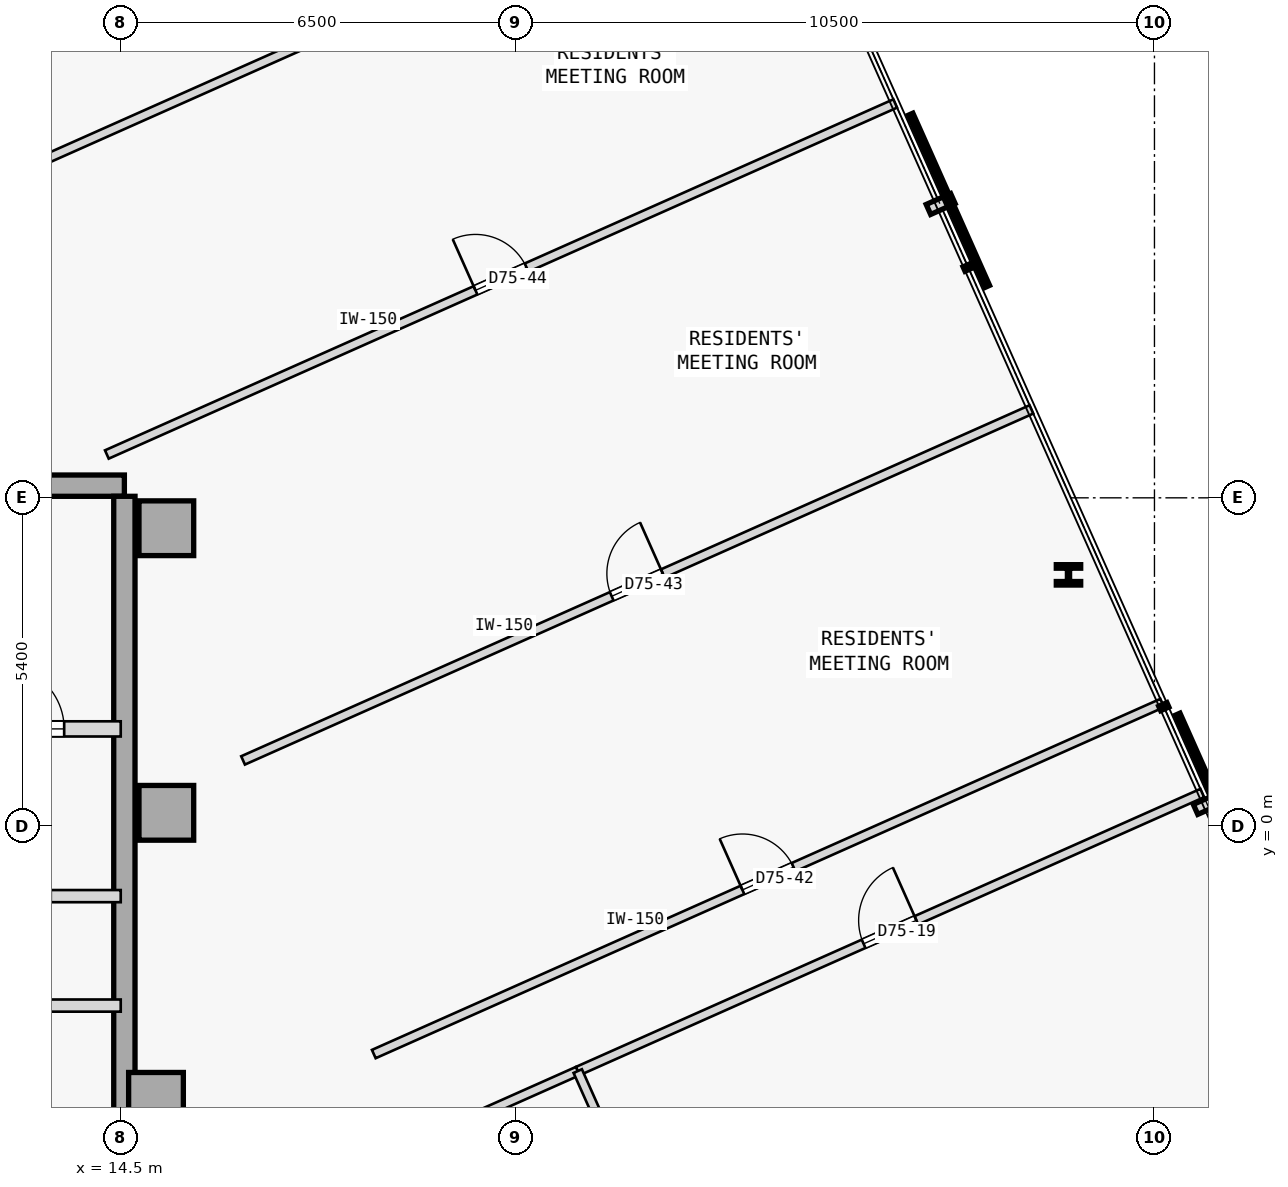
"""IFC4 building model, lengths in metres.
Left out: names, types, materials, properties, quantities, classifications, styles, units other than length and angle.
Written with IfcOpenShell. Run it as: python <this file> out.ifc"""

import sys

from ifc_helpers import new_model, si_unit, direction, frame, frame_2d, origin, origin_2d, place, context, subcontext, project, spatial, rectangle, i_section, extrude, element, fill, save


model = new_model("IFC4")
c1 = context("Model", 3, precision=1e-05, world=origin(), true_north=direction((0.0, 1.0)))
c2 = subcontext(c1, "Body", "Model", "MODEL_VIEW")
j1 = project(units=[si_unit("LENGTHUNIT", "METRE"), si_unit("PLANEANGLEUNIT", "RADIAN")], contexts=[c1])
p1 = place(None, origin())
s1 = spatial("IfcSite", under=j1, at=p1, CompositionType="ELEMENT")
p2 = place(p1, origin())
s2 = spatial("IfcBuilding", under=s1, at=p2, CompositionType="ELEMENT")
p3 = place(p2, frame((0.0, 0.0, 281.9)))
s3 = spatial("IfcBuildingStorey", under=s2, at=p3, CompositionType="ELEMENT", Elevation=281.9)
for number, where, z_axis, x_axis in (
    (1, (15.25, 4.9, 0.0), (0.0, 0.0, 1.0), (1.0, 0.0, 0.0)),
    (2, (15.25, 0.22, 0.0), (0.0, 0.0, 1.0), (1.0, 0.0, 0.0)),
    (3, (15.08, -4.5, 0.0), (0.0, 0.0, 1.0), (1.0, 0.0, 0.0)),
):
    element("IfcColumn", number, at=place(p3, frame(where, z_axis=z_axis, x_axis=x_axis)), inside=s3, PredefinedType="COLUMN", context=c2, shape_type="SweptSolid", body=[
        extrude(rectangle(XDim=0.9, YDim=0.9, at=origin_2d()), origin(), (0.0, 0.0, 1.0), 3.35),
    ])
p4 = place(p3, frame((3.15, 5.6, 0.0), z_axis=(0.0, 0.0, 1.0), x_axis=(1.0, 0.0, 0.0)))
e4 = element("IfcWall", 4, at=p4, inside=s3, PredefinedType="SHEAR", context=c2, shape_type="SweptSolid", body=[
    extrude(rectangle(XDim=11.41, YDim=0.35, at=frame_2d((5.705, 0.0))), origin(), (0.0, 0.0, 1.0), 3.125),
])
p5 = place(p3, frame((14.56, -5.425, 0.0), z_axis=(0.0, 0.0, 1.0), x_axis=(0.0, 1.0, 0.0)))
e5 = element("IfcWall", 5, at=p5, inside=s3, PredefinedType="SHEAR", context=c2, shape_type="SweptSolid", body=[
    extrude(rectangle(XDim=10.85, YDim=0.35, at=frame_2d((5.425, 0.0))), origin(), (0.0, 0.0, 1.0), 3.125),
])
p6 = place(p3, frame((30.086, 4.133, 0.0), z_axis=(0.0, 0.0, 1.0), x_axis=(1.0, 0.0, 0.0)))
e6 = element("IfcColumn", 6, at=p6, inside=s3, PredefinedType="COLUMN", context=c2, shape_type="SweptSolid", body=[
    extrude(i_section(OverallWidth=0.401, OverallDepth=0.335, WebThickness=0.036, FlangeThickness=0.058, FilletRadius=0.015, at=origin_2d()), origin(), (0.0, 0.0, 1.0), 3.35),
])
p7 = place(p3, frame((10.9, 1.6, 0.0), z_axis=(0.0, 0.0, 1.0), x_axis=(1.0, 0.0, 0.0)))
e7 = element("IfcWall", 7, at=p7, inside=s3, PredefinedType="STANDARD", context=c2, shape_type="SweptSolid", body=[
    extrude(rectangle(XDim=3.6, YDim=0.25, at=frame_2d((1.8, 0.0))), origin(), (0.0, 0.0, 1.0), 3.125),
])
p8 = place(p7, frame((1.62, 0.0, 0.0)))
e8 = element("IfcOpeningElement", 8, at=p8, cuts=e7, PredefinedType="OPENING", context=c2, shape_type="SweptSolid", body=[
    extrude(rectangle(XDim=1.05, YDim=2.15, at=frame_2d((0.525, 1.075))), frame((0.0, 0.135, 0.0), z_axis=(0.0, -1.0, 0.0), x_axis=(1.0, 0.0, 0.0)), (0.0, 0.0, 1.0), 0.27),
])
p9 = place(p3, frame((11.55, -1.15, 0.0), z_axis=(0.0, 0.0, 1.0), x_axis=(1.0, 0.0, 0.0)))
e9 = element("IfcWall", 9, at=p9, inside=s3, PredefinedType="STANDARD", context=c2, shape_type="SweptSolid", body=[
    extrude(rectangle(XDim=2.95, YDim=0.2, at=frame_2d((1.475, 0.0))), origin(), (0.0, 0.0, 1.0), 3.125),
])
p10 = place(p9, frame((0.75, 0.0, 0.0)))
e10 = element("IfcOpeningElement", 10, at=p10, cuts=e9, PredefinedType="OPENING", context=c2, shape_type="SweptSolid", body=[
    extrude(rectangle(XDim=1.05, YDim=2.18, at=frame_2d((0.525, 1.09))), frame((0.0, 0.11, 0.0), z_axis=(0.0, -1.0, 0.0), x_axis=(1.0, 0.0, 0.0)), (0.0, 0.0, 1.0), 0.22),
])
p11 = place(p3, frame((3.7, -2.95, 0.0), z_axis=(0.0, 0.0, 1.0), x_axis=(1.0, 0.0, 0.0)))
e11 = element("IfcWall", 11, at=p11, inside=s3, PredefinedType="STANDARD", context=c2, shape_type="SweptSolid", body=[
    extrude(rectangle(XDim=10.8, YDim=0.2, at=frame_2d((5.4, 0.0))), origin(), (0.0, 0.0, 1.0), 3.125),
])
p12 = place(p11, frame((0.53, 0.0, 0.0)))
e12 = element("IfcOpeningElement", 12, at=p12, cuts=e11, PredefinedType="OPENING", context=c2, shape_type="SweptSolid", body=[
    extrude(rectangle(XDim=1.1, YDim=2.15, at=frame_2d((0.55, 1.075))), frame((0.0, 0.11, 0.0), z_axis=(0.0, -1.0, 0.0), x_axis=(1.0, 0.0, 0.0)), (0.0, 0.0, 1.0), 0.22),
])
p13 = place(p11, frame((3.79, 0.0, 0.0)))
e13 = element("IfcOpeningElement", 13, at=p13, cuts=e11, PredefinedType="OPENING", context=c2, shape_type="SweptSolid", body=[
    extrude(rectangle(XDim=0.92, YDim=2.15, at=frame_2d((0.46, 1.075))), frame((0.0, 0.11, 0.0), z_axis=(0.0, -1.0, 0.0), x_axis=(1.0, 0.0, 0.0)), (0.0, 0.0, 1.0), 0.22),
])
p14 = place(p11, frame((8.11, 0.0, 0.0)))
e14 = element("IfcOpeningElement", 14, at=p14, cuts=e11, PredefinedType="OPENING", context=c2, shape_type="SweptSolid", body=[
    extrude(rectangle(XDim=0.92, YDim=2.15, at=frame_2d((0.46, 1.075))), frame((0.0, 0.11, 0.0), z_axis=(0.0, -1.0, 0.0), x_axis=(1.0, 0.0, 0.0)), (0.0, 0.0, 1.0), 0.22),
])
p15 = place(p3, frame((22.016, -4.027, 0.0), z_axis=(0.0, 0.0, 1.0), x_axis=(0.913548968583, 0.406728757282, 0.0)))
e15 = element("IfcWall", 15, at=p15, inside=s3, PredefinedType="PARTITIONING", context=c2, shape_type="SweptSolid", body=[
    extrude(rectangle(XDim=11.242, YDim=0.15, at=frame_2d((5.621, 0.0))), origin(), (0.0, 0.0, 1.0), 3.125),
])
p16 = place(p15, frame((5.146, 0.0, 0.0)))
e16 = element("IfcOpeningElement", 16, at=p16, cuts=e15, PredefinedType="OPENING", context=c2, shape_type="SweptSolid", body=[
    extrude(rectangle(XDim=0.95, YDim=2.15, at=frame_2d((0.475, 1.075))), frame((0.0, 0.085, 0.0), z_axis=(0.0, -1.0, 0.0), x_axis=(1.0, 0.0, 0.0)), (0.0, 0.0, 1.0), 0.17),
])
p17 = place(p3, frame((18.818, -5.451, 0.0), z_axis=(0.0, 0.0, 1.0), x_axis=(0.913538066796, 0.406753242783, 0.0)))
e17 = element("IfcWall", 17, at=p17, inside=s3, PredefinedType="PARTITIONING", context=c2, shape_type="SweptSolid", body=[
    extrude(rectangle(XDim=3.5, YDim=0.15, at=frame_2d((1.75, 0.0))), origin(), (0.0, 0.0, 1.0), 3.125),
])
p18 = place(p3, frame((18.662, -3.747, 0.0), z_axis=(0.0, 0.0, 1.0), x_axis=(0.913544622417, 0.406738519018, 0.0)))
e18 = element("IfcWall", 18, at=p18, inside=s3, PredefinedType="PARTITIONING", context=c2, shape_type="SweptSolid", body=[
    extrude(rectangle(XDim=14.192, YDim=0.15, at=frame_2d((7.096, 0.0))), origin(), (0.0, 0.0, 1.0), 3.125),
])
p19 = place(p18, frame((6.636, 0.0, 0.0)))
e19 = element("IfcOpeningElement", 19, at=p19, cuts=e18, PredefinedType="OPENING", context=c2, shape_type="SweptSolid", body=[
    extrude(rectangle(XDim=0.92, YDim=2.15, at=frame_2d((0.46, 1.075))), frame((0.0, 0.085, 0.0), z_axis=(0.0, -1.0, 0.0), x_axis=(1.0, 0.0, 0.0)), (0.0, 0.0, 1.0), 0.17),
])
p20 = place(p3, frame((22.911, -6.037, 0.0), z_axis=(0.0, 0.0, 1.0), x_axis=(-0.40677666873, 0.913527636022, 0.0)))
e20 = element("IfcWall", 20, at=p20, inside=s3, PredefinedType="PARTITIONING", context=c2, shape_type="SweptSolid", body=[
    extrude(rectangle(XDim=2.2, YDim=0.15, at=frame_2d((1.1, 0.0))), origin(), (0.0, 0.0, 1.0), 3.125),
])
p21 = place(p3, frame((16.512, 1.082, 0.0), z_axis=(0.0, 0.0, 1.0), x_axis=(0.913544622417, 0.406738519018, 0.0)))
e21 = element("IfcWall", 21, at=p21, inside=s3, PredefinedType="PARTITIONING", context=c2, shape_type="SweptSolid", body=[
    extrude(rectangle(XDim=14.192, YDim=0.15, at=frame_2d((7.096, 0.0))), origin(), (0.0, 0.0, 1.0), 3.125),
])
p22 = place(p21, frame((6.636, 0.0, 0.0)))
e22 = element("IfcOpeningElement", 22, at=p22, cuts=e21, PredefinedType="OPENING", context=c2, shape_type="SweptSolid", body=[
    extrude(rectangle(XDim=0.92, YDim=2.15, at=frame_2d((0.46, 1.075))), frame((0.0, 0.085, 0.0), z_axis=(0.0, -1.0, 0.0), x_axis=(1.0, 0.0, 0.0)), (0.0, 0.0, 1.0), 0.17),
])
p23 = place(p3, frame((14.272, 6.113, 0.0), z_axis=(0.0, 0.0, 1.0), x_axis=(0.913551014388, 0.406724162191, 0.0)))
e23 = element("IfcWall", 23, at=p23, inside=s3, PredefinedType="PARTITIONING", context=c2, shape_type="SweptSolid", body=[
    extrude(rectangle(XDim=14.192, YDim=0.15, at=frame_2d((7.096, 0.0))), origin(), (0.0, 0.0, 1.0), 3.125),
])
p24 = place(p23, frame((6.636, 0.0, 0.0)))
e24 = element("IfcOpeningElement", 24, at=p24, cuts=e23, PredefinedType="OPENING", context=c2, shape_type="SweptSolid", body=[
    extrude(rectangle(XDim=0.92, YDim=2.15, at=frame_2d((0.46, 1.075))), frame((0.0, 0.085, 0.0), z_axis=(0.0, -1.0, 0.0), x_axis=(1.0, 0.0, 0.0)), (0.0, 0.0, 1.0), 0.17),
])
p25 = place(p3, frame((12.301, 10.54, 0.0), z_axis=(0.0, 0.0, 1.0), x_axis=(0.913544622417, 0.406738519018, 0.0)))
e25 = element("IfcWall", 25, at=p25, inside=s3, PredefinedType="PARTITIONING", context=c2, shape_type="SweptSolid", body=[
    extrude(rectangle(XDim=14.192, YDim=0.15, at=frame_2d((7.096, 0.0))), origin(), (0.0, 0.0, 1.0), 2.675),
])
p26 = place(p25, frame((6.636, 0.0, 0.0)))
e26 = element("IfcOpeningElement", 26, at=p26, cuts=e25, PredefinedType="OPENING", context=c2, shape_type="SweptSolid", body=[
    extrude(rectangle(XDim=0.92, YDim=2.15, at=frame_2d((0.46, 1.075))), frame((0.0, 0.085, 0.0), z_axis=(0.0, -1.0, 0.0), x_axis=(1.0, 0.0, 0.0)), (0.0, 0.0, 1.0), 0.17),
])
p27 = place(p8, origin())
e27 = element("IfcDoor", 27, at=p27, inside=s3, OperationType="SINGLE_SWING_LEFT", PredefinedType="DOOR", context=c2, shape_type="SweptSolid", body=[
    extrude(rectangle(XDim=1.05, YDim=2.15, at=frame_2d((0.525, 1.075))), frame((0.0, 0.025, 0.0), z_axis=(0.0, -1.0, 0.0), x_axis=(1.0, 0.0, 0.0)), (0.0, 0.0, 1.0), 0.05),
])
fill(e8, e27)
p28 = place(p16, origin())
e28 = element("IfcDoor", 28, at=p28, inside=s3, OperationType="SINGLE_SWING_RIGHT", PredefinedType="DOOR", context=c2, shape_type="SweptSolid", body=[
    extrude(rectangle(XDim=0.95, YDim=2.15, at=frame_2d((0.475, 1.075))), frame((0.0, 0.025, 0.0), z_axis=(0.0, -1.0, 0.0), x_axis=(1.0, 0.0, 0.0)), (0.0, 0.0, 1.0), 0.05),
])
fill(e16, e28)
p29 = place(p19, origin())
e29 = element("IfcDoor", 29, at=p29, inside=s3, OperationType="SINGLE_SWING_LEFT", PredefinedType="DOOR", context=c2, shape_type="SweptSolid", body=[
    extrude(rectangle(XDim=0.92, YDim=2.15, at=frame_2d((0.46, 1.075))), frame((0.0, 0.025, 0.0), z_axis=(0.0, -1.0, 0.0), x_axis=(1.0, 0.0, 0.0)), (0.0, 0.0, 1.0), 0.05),
])
fill(e19, e29)
p30 = place(p22, origin())
e30 = element("IfcDoor", 30, at=p30, inside=s3, OperationType="SINGLE_SWING_RIGHT", PredefinedType="DOOR", context=c2, shape_type="SweptSolid", body=[
    extrude(rectangle(XDim=0.92, YDim=2.15, at=frame_2d((0.46, 1.075))), frame((0.0, 0.025, 0.0), z_axis=(0.0, -1.0, 0.0), x_axis=(1.0, 0.0, 0.0)), (0.0, 0.0, 1.0), 0.05),
])
fill(e22, e30)
p31 = place(p24, origin())
e31 = element("IfcDoor", 31, at=p31, inside=s3, OperationType="SINGLE_SWING_LEFT", PredefinedType="DOOR", context=c2, shape_type="SweptSolid", body=[
    extrude(rectangle(XDim=0.92, YDim=2.15, at=frame_2d((0.46, 1.075))), frame((0.0, 0.025, 0.0), z_axis=(0.0, -1.0, 0.0), x_axis=(1.0, 0.0, 0.0)), (0.0, 0.0, 1.0), 0.05),
])
fill(e24, e31)
save(model, sys.argv[1])
